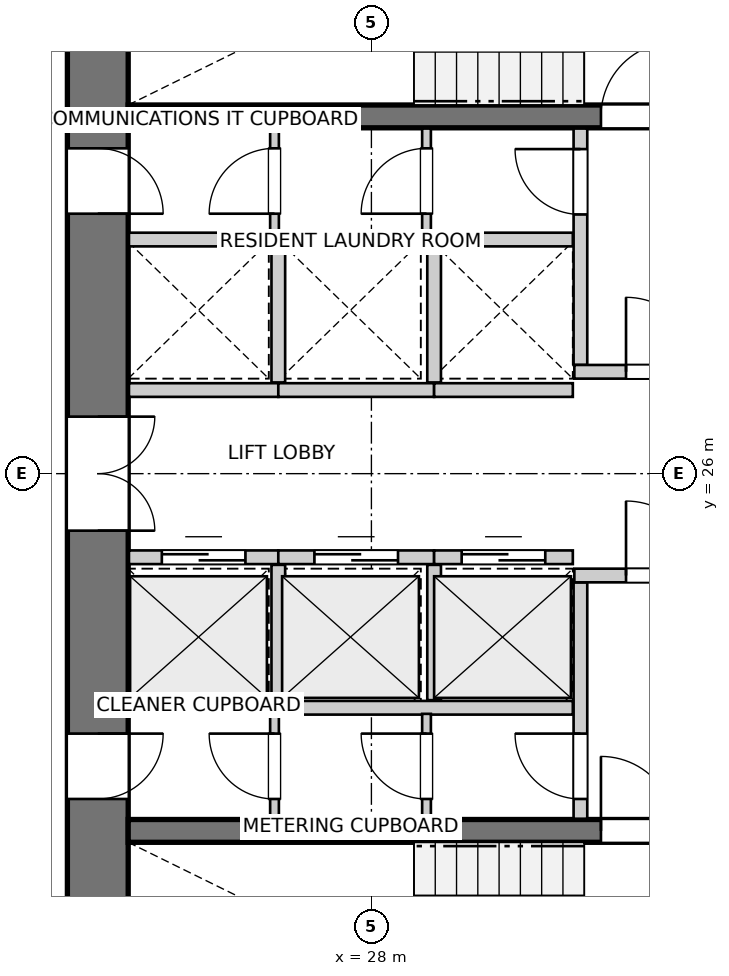
"""IFC4 building model, lengths in metres.
Left out: names, types, materials, properties, quantities, classifications, styles, units other than length and angle.
Written with IfcOpenShell. Run it as: python <this file> out.ifc"""

import sys

from ifc_helpers import new_model, si_unit, direction, frame, frame_2d, origin, place, context, subcontext, project, spatial, rectangle, extrude, source, transform, mapped, element, fill, save


model = new_model("IFC4")
c1 = context("Model", 3, precision=1e-05, world=origin(), true_north=direction((0.0, 1.0)))
c2 = subcontext(c1, "Body", "Model", "MODEL_VIEW")
j1 = project(units=[si_unit("LENGTHUNIT", "METRE"), si_unit("PLANEANGLEUNIT", "RADIAN")], contexts=[c1])
p1 = place(None, origin())
s1 = spatial("IfcSite", under=j1, at=p1, CompositionType="ELEMENT")
p2 = place(p1, origin())
s2 = spatial("IfcBuilding", under=s1, at=p2, CompositionType="ELEMENT")
p3 = place(p2, frame((0.0, 0.0, 27.0)))
s3 = spatial("IfcBuildingStorey", under=s2, at=p3, CompositionType="ELEMENT", Elevation=27.0)
p4 = place(p3, frame((24.4, 33.8, 0.0), z_axis=(0.0, 0.0, 1.0), x_axis=(0.0, -1.0, 0.0)))
e1 = element("IfcWall", 1, at=p4, inside=s3, PredefinedType="SHEAR", context=c2, shape_type="SweptSolid", body=[
    extrude(rectangle(XDim=15.6, YDim=0.8, at=frame_2d((7.8, 0.0))), origin(), (0.0, 0.0, 1.0), 2.935),
])
p5 = place(p4, frame((7.05, 0.0, 0.0)))
e2 = element("IfcOpeningElement", 2, at=p5, cuts=e1, PredefinedType="OPENING", context=c2, shape_type="SweptSolid", body=[
    extrude(rectangle(XDim=1.5, YDim=2.15, at=frame_2d((0.75, 1.075))), frame((0.0, 0.41, 0.0), z_axis=(0.0, -1.0, 0.0), x_axis=(1.0, 0.0, 0.0)), (0.0, 0.0, 1.0), 0.82),
])
p6 = place(p4, frame((3.52, 0.0, 0.0)))
e3 = element("IfcOpeningElement", 3, at=p6, cuts=e1, PredefinedType="OPENING", context=c2, shape_type="SweptSolid", body=[
    extrude(rectangle(XDim=0.86, YDim=2.05, at=frame_2d((0.43, 1.025))), frame((0.0, 0.41, 0.0), z_axis=(0.0, -1.0, 0.0), x_axis=(1.0, 0.0, 0.0)), (0.0, 0.0, 1.0), 0.82),
])
p7 = place(p4, frame((11.22, 0.0, 0.0)))
e4 = element("IfcOpeningElement", 4, at=p7, cuts=e1, PredefinedType="OPENING", context=c2, shape_type="SweptSolid", body=[
    extrude(rectangle(XDim=0.86, YDim=2.05, at=frame_2d((0.43, 1.025))), frame((0.0, 0.41, 0.0), z_axis=(0.0, -1.0, 0.0), x_axis=(1.0, 0.0, 0.0)), (0.0, 0.0, 1.0), 0.82),
])
p8 = place(p3, frame((24.8, 21.3, 0.0), z_axis=(0.0, 0.0, 1.0), x_axis=(1.0, 0.0, 0.0)))
e5 = element("IfcWall", 5, at=p8, inside=s3, PredefinedType="SHEAR", context=c2, shape_type="SweptSolid", body=[
    extrude(rectangle(XDim=11.1, YDim=0.3, at=frame_2d((5.55, 0.0))), origin(), (0.0, 0.0, 1.0), 2.935),
])
p9 = place(p8, frame((6.22, 0.0, 0.0)))
e6 = element("IfcOpeningElement", 6, at=p9, cuts=e5, PredefinedType="OPENING", context=c2, shape_type="SweptSolid", body=[
    extrude(rectangle(XDim=0.98, YDim=2.15, at=frame_2d((0.49, 1.075))), frame((0.0, 0.16, 0.0), z_axis=(0.0, -1.0, 0.0), x_axis=(1.0, 0.0, 0.0)), (0.0, 0.0, 1.0), 0.32),
])
p10 = place(p8, frame((9.15, 0.0, 0.0)))
e7 = element("IfcOpeningElement", 7, at=p10, cuts=e5, PredefinedType="OPENING", context=c2, shape_type="SweptSolid", body=[
    extrude(rectangle(XDim=1.15, YDim=2.15, at=frame_2d((0.575, 1.075))), frame((0.0, 0.16, 0.0), z_axis=(0.0, -1.0, 0.0), x_axis=(1.0, 0.0, 0.0)), (0.0, 0.0, 1.0), 0.32),
])
p11 = place(p3, frame((24.8, 30.7, 0.0), z_axis=(0.0, 0.0, 1.0), x_axis=(1.0, 0.0, 0.0)))
e8 = element("IfcWall", 8, at=p11, inside=s3, PredefinedType="SHEAR", context=c2, shape_type="SweptSolid", body=[
    extrude(rectangle(XDim=11.1, YDim=0.3, at=frame_2d((5.55, 0.0))), origin(), (0.0, 0.0, 1.0), 2.935),
])
p12 = place(p11, frame((6.22, 0.0, 0.0)))
e9 = element("IfcOpeningElement", 9, at=p12, cuts=e8, PredefinedType="OPENING", context=c2, shape_type="SweptSolid", body=[
    extrude(rectangle(XDim=0.98, YDim=2.15, at=frame_2d((0.49, 1.075))), frame((0.0, 0.16, 0.0), z_axis=(0.0, -1.0, 0.0), x_axis=(1.0, 0.0, 0.0)), (0.0, 0.0, 1.0), 0.32),
])
p13 = place(p11, frame((9.15, 0.0, 0.0)))
e10 = element("IfcOpeningElement", 10, at=p13, cuts=e8, PredefinedType="OPENING", context=c2, shape_type="SweptSolid", body=[
    extrude(rectangle(XDim=1.15, YDim=2.15, at=frame_2d((0.575, 1.075))), frame((0.0, 0.16, 0.0), z_axis=(0.0, -1.0, 0.0), x_axis=(1.0, 0.0, 0.0)), (0.0, 0.0, 1.0), 0.32),
])
p14 = place(p3, frame((30.75, 21.46, 0.0), z_axis=(0.0, 0.0, 1.0), x_axis=(0.0, 1.0, 0.0)))
e11 = element("IfcWall", 11, at=p14, inside=s3, PredefinedType="PARTITIONING", context=c2, shape_type="SweptSolid", body=[
    extrude(rectangle(XDim=3.11, YDim=0.18, at=frame_2d((1.555, 0.0))), origin(), (0.0, 0.0, 1.0), 2.935),
])
p15 = place(p14, frame((0.26, 0.0, 0.0)))
e12 = element("IfcOpeningElement", 12, at=p15, cuts=e11, PredefinedType="OPENING", context=c2, shape_type="SweptSolid", body=[
    extrude(rectangle(XDim=0.86, YDim=2.05, at=frame_2d((0.43, 1.025))), frame((0.0, 0.1, 0.0), z_axis=(0.0, -1.0, 0.0), x_axis=(1.0, 0.0, 0.0)), (0.0, 0.0, 1.0), 0.2),
])
p16 = place(p3, frame((30.67, 24.66, 0.0), z_axis=(0.0, 0.0, 1.0), x_axis=(1.0, 0.0, 0.0)))
e13 = element("IfcWall", 13, at=p16, inside=s3, PredefinedType="PARTITIONING", context=c2, shape_type="SweptSolid", body=[
    extrude(rectangle(XDim=5.22, YDim=0.18, at=frame_2d((2.61, 0.0))), origin(), (0.0, 0.0, 1.0), 2.935),
])
p17 = place(p16, frame((0.68, 0.0, 0.0)))
e14 = element("IfcOpeningElement", 14, at=p17, cuts=e13, PredefinedType="OPENING", context=c2, shape_type="SweptSolid", body=[
    extrude(rectangle(XDim=0.98, YDim=2.15, at=frame_2d((0.49, 1.075))), frame((0.0, 0.1, 0.0), z_axis=(0.0, -1.0, 0.0), x_axis=(1.0, 0.0, 0.0)), (0.0, 0.0, 1.0), 0.2),
])
p18 = place(p3, frame((30.75, 27.43, 0.0), z_axis=(0.0, 0.0, 1.0), x_axis=(0.0, 1.0, 0.0)))
e15 = element("IfcWall", 15, at=p18, inside=s3, PredefinedType="PARTITIONING", context=c2, shape_type="SweptSolid", body=[
    extrude(rectangle(XDim=3.11, YDim=0.18, at=frame_2d((1.555, 0.0))), origin(), (0.0, 0.0, 1.0), 2.935),
])
p19 = place(p18, frame((1.98, 0.0, 0.0)))
e16 = element("IfcOpeningElement", 16, at=p19, cuts=e15, PredefinedType="OPENING", context=c2, shape_type="SweptSolid", body=[
    extrude(rectangle(XDim=0.86, YDim=2.05, at=frame_2d((0.43, 1.025))), frame((0.0, 0.1, 0.0), z_axis=(0.0, -1.0, 0.0), x_axis=(1.0, 0.0, 0.0)), (0.0, 0.0, 1.0), 0.2),
])
p20 = place(p3, frame((30.67, 27.34, 0.0), z_axis=(0.0, 0.0, 1.0), x_axis=(1.0, 0.0, 0.0)))
e17 = element("IfcWall", 17, at=p20, inside=s3, PredefinedType="PARTITIONING", context=c2, shape_type="SweptSolid", body=[
    extrude(rectangle(XDim=5.22, YDim=0.18, at=frame_2d((2.61, 0.0))), origin(), (0.0, 0.0, 1.0), 2.935),
])
p21 = place(p20, frame((0.68, 0.0, 0.0)))
e18 = element("IfcOpeningElement", 18, at=p21, cuts=e17, PredefinedType="OPENING", context=c2, shape_type="SweptSolid", body=[
    extrude(rectangle(XDim=0.98, YDim=2.15, at=frame_2d((0.49, 1.075))), frame((0.0, 0.1, 0.0), z_axis=(0.0, -1.0, 0.0), x_axis=(1.0, 0.0, 0.0)), (0.0, 0.0, 1.0), 0.2),
])
p22 = place(p3, frame((24.81, 22.92, 0.0), z_axis=(0.0, 0.0, 1.0), x_axis=(1.0, 0.0, 0.0)))
e19 = element("IfcWall", 19, at=p22, inside=s3, PredefinedType="PARTITIONING", context=c2, shape_type="SweptSolid", body=[
    extrude(rectangle(XDim=5.84, YDim=0.18, at=frame_2d((2.92, 0.0))), origin(), (0.0, 0.0, 1.0), 2.935),
])
p23 = place(p3, frame((24.81, 24.9, 0.0), z_axis=(0.0, 0.0, 1.0), x_axis=(1.0, 0.0, 0.0)))
e20 = element("IfcWall", 20, at=p23, inside=s3, PredefinedType="PARTITIONING", context=c2, shape_type="SweptSolid", body=[
    extrude(rectangle(XDim=1.965, YDim=0.18, at=frame_2d((0.982, 0.0))), origin(), (0.0, 0.0, 1.0), 2.935),
])
p24 = place(p23, frame((0.433, 0.0, 0.0)))
e21 = element("IfcOpeningElement", 21, at=p24, cuts=e20, PredefinedType="OPENING", context=c2, shape_type="SweptSolid", body=[
    extrude(rectangle(XDim=1.1, YDim=2.15, at=frame_2d((0.55, 1.075))), frame((0.0, 0.1, 0.0), z_axis=(0.0, -1.0, 0.0), x_axis=(1.0, 0.0, 0.0)), (0.0, 0.0, 1.0), 0.2),
])
p25 = place(p3, frame((26.775, 24.9, 0.0), z_axis=(0.0, 0.0, 1.0), x_axis=(1.0, 0.0, 0.0)))
e22 = element("IfcWall", 22, at=p25, inside=s3, PredefinedType="PARTITIONING", context=c2, shape_type="SweptSolid", body=[
    extrude(rectangle(XDim=2.05, YDim=0.18, at=frame_2d((1.025, 0.0))), origin(), (0.0, 0.0, 1.0), 2.935),
])
p26 = place(p25, frame((0.475, 0.0, 0.0)))
e23 = element("IfcOpeningElement", 23, at=p26, cuts=e22, PredefinedType="OPENING", context=c2, shape_type="SweptSolid", body=[
    extrude(rectangle(XDim=1.1, YDim=2.15, at=frame_2d((0.55, 1.075))), frame((0.0, 0.1, 0.0), z_axis=(0.0, -1.0, 0.0), x_axis=(1.0, 0.0, 0.0)), (0.0, 0.0, 1.0), 0.2),
])
p27 = place(p3, frame((26.775, 23.02, 0.0), z_axis=(0.0, 0.0, 1.0), x_axis=(0.0, 1.0, 0.0)))
e24 = element("IfcWall", 24, at=p27, inside=s3, PredefinedType="PARTITIONING", context=c2, shape_type="SweptSolid", body=[
    extrude(rectangle(XDim=1.78, YDim=0.18, at=frame_2d((0.89, 0.0))), origin(), (0.0, 0.0, 1.0), 2.935),
])
p28 = place(p3, frame((28.825, 24.9, 0.0), z_axis=(0.0, 0.0, 1.0), x_axis=(1.0, 0.0, 0.0)))
e25 = element("IfcWall", 25, at=p28, inside=s3, PredefinedType="PARTITIONING", context=c2, shape_type="SweptSolid", body=[
    extrude(rectangle(XDim=1.825, YDim=0.18, at=frame_2d((0.913, 0.0))), origin(), (0.0, 0.0, 1.0), 2.935),
])
p29 = place(p28, frame((0.363, 0.0, 0.0)))
e26 = element("IfcOpeningElement", 26, at=p29, cuts=e25, PredefinedType="OPENING", context=c2, shape_type="SweptSolid", body=[
    extrude(rectangle(XDim=1.1, YDim=2.15, at=frame_2d((0.55, 1.075))), frame((0.0, 0.1, 0.0), z_axis=(0.0, -1.0, 0.0), x_axis=(1.0, 0.0, 0.0)), (0.0, 0.0, 1.0), 0.2),
])
p30 = place(p3, frame((28.825, 23.02, 0.0), z_axis=(0.0, 0.0, 1.0), x_axis=(0.0, 1.0, 0.0)))
e27 = element("IfcWall", 27, at=p30, inside=s3, PredefinedType="PARTITIONING", context=c2, shape_type="SweptSolid", body=[
    extrude(rectangle(XDim=1.78, YDim=0.18, at=frame_2d((0.89, 0.0))), origin(), (0.0, 0.0, 1.0), 2.935),
])
p31 = place(p3, frame((24.81, 29.08, 0.0), z_axis=(0.0, 0.0, 1.0), x_axis=(1.0, 0.0, 0.0)))
e28 = element("IfcWall", 28, at=p31, inside=s3, PredefinedType="PARTITIONING", context=c2, shape_type="SweptSolid", body=[
    extrude(rectangle(XDim=5.84, YDim=0.18, at=frame_2d((2.92, 0.0))), origin(), (0.0, 0.0, 1.0), 2.935),
])
p32 = place(p3, frame((24.81, 27.1, 0.0), z_axis=(0.0, 0.0, 1.0), x_axis=(1.0, 0.0, 0.0)))
e29 = element("IfcWall", 29, at=p32, inside=s3, PredefinedType="PARTITIONING", context=c2, shape_type="SweptSolid", body=[
    extrude(rectangle(XDim=1.965, YDim=0.18, at=frame_2d((0.982, 0.0))), origin(), (0.0, 0.0, 1.0), 2.935),
])
p33 = place(p3, frame((26.775, 27.1, 0.0), z_axis=(0.0, 0.0, 1.0), x_axis=(1.0, 0.0, 0.0)))
e30 = element("IfcWall", 30, at=p33, inside=s3, PredefinedType="PARTITIONING", context=c2, shape_type="SweptSolid", body=[
    extrude(rectangle(XDim=2.05, YDim=0.18, at=frame_2d((1.025, 0.0))), origin(), (0.0, 0.0, 1.0), 2.935),
])
p34 = place(p3, frame((26.775, 27.2, 0.0), z_axis=(0.0, 0.0, 1.0), x_axis=(0.0, 1.0, 0.0)))
e31 = element("IfcWall", 31, at=p34, inside=s3, PredefinedType="PARTITIONING", context=c2, shape_type="SweptSolid", body=[
    extrude(rectangle(XDim=1.78, YDim=0.18, at=frame_2d((0.89, 0.0))), origin(), (0.0, 0.0, 1.0), 2.935),
])
p35 = place(p3, frame((28.825, 27.1, 0.0), z_axis=(0.0, 0.0, 1.0), x_axis=(1.0, 0.0, 0.0)))
e32 = element("IfcWall", 32, at=p35, inside=s3, PredefinedType="PARTITIONING", context=c2, shape_type="SweptSolid", body=[
    extrude(rectangle(XDim=1.825, YDim=0.18, at=frame_2d((0.913, 0.0))), origin(), (0.0, 0.0, 1.0), 2.935),
])
p36 = place(p3, frame((28.825, 27.2, 0.0), z_axis=(0.0, 0.0, 1.0), x_axis=(0.0, 1.0, 0.0)))
e33 = element("IfcWall", 33, at=p36, inside=s3, PredefinedType="PARTITIONING", context=c2, shape_type="SweptSolid", body=[
    extrude(rectangle(XDim=1.78, YDim=0.18, at=frame_2d((0.89, 0.0))), origin(), (0.0, 0.0, 1.0), 2.935),
])
p37 = place(p3, frame((26.725, 21.46, 0.0), z_axis=(0.0, 0.0, 1.0), x_axis=(0.0, 1.0, 0.0)))
e34 = element("IfcWall", 34, at=p37, inside=s3, PredefinedType="PARTITIONING", context=c2, shape_type="SweptSolid", body=[
    extrude(rectangle(XDim=1.38, YDim=0.115, at=frame_2d((0.69, 0.0))), origin(), (0.0, 0.0, 1.0), 2.935),
])
p38 = place(p37, frame((0.26, 0.0, 0.0)))
e35 = element("IfcOpeningElement", 35, at=p38, cuts=e34, PredefinedType="OPENING", context=c2, shape_type="SweptSolid", body=[
    extrude(rectangle(XDim=0.86, YDim=2.05, at=frame_2d((0.43, 1.025))), frame((0.0, 0.067, 0.0), z_axis=(0.0, -1.0, 0.0), x_axis=(1.0, 0.0, 0.0)), (0.0, 0.0, 1.0), 0.135),
])
p39 = place(p3, frame((26.725, 29.16, 0.0), z_axis=(0.0, 0.0, 1.0), x_axis=(0.0, 1.0, 0.0)))
e36 = element("IfcWall", 36, at=p39, inside=s3, PredefinedType="PARTITIONING", context=c2, shape_type="SweptSolid", body=[
    extrude(rectangle(XDim=1.38, YDim=0.115, at=frame_2d((0.69, 0.0))), origin(), (0.0, 0.0, 1.0), 2.935),
])
p40 = place(p39, frame((0.26, 0.0, 0.0)))
e37 = element("IfcOpeningElement", 37, at=p40, cuts=e36, PredefinedType="OPENING", context=c2, shape_type="SweptSolid", body=[
    extrude(rectangle(XDim=0.86, YDim=2.05, at=frame_2d((0.43, 1.025))), frame((0.0, 0.067, 0.0), z_axis=(0.0, -1.0, 0.0), x_axis=(1.0, 0.0, 0.0)), (0.0, 0.0, 1.0), 0.135),
])
p41 = place(p3, frame((28.725, 21.46, 0.0), z_axis=(0.0, 0.0, 1.0), x_axis=(0.0, 1.0, 0.0)))
e38 = element("IfcWall", 38, at=p41, inside=s3, PredefinedType="PARTITIONING", context=c2, shape_type="SweptSolid", body=[
    extrude(rectangle(XDim=1.38, YDim=0.115, at=frame_2d((0.69, 0.0))), origin(), (0.0, 0.0, 1.0), 2.935),
])
p42 = place(p41, frame((0.26, 0.0, 0.0)))
e39 = element("IfcOpeningElement", 39, at=p42, cuts=e38, PredefinedType="OPENING", context=c2, shape_type="SweptSolid", body=[
    extrude(rectangle(XDim=0.86, YDim=2.05, at=frame_2d((0.43, 1.025))), frame((0.0, 0.067, 0.0), z_axis=(0.0, -1.0, 0.0), x_axis=(1.0, 0.0, 0.0)), (0.0, 0.0, 1.0), 0.135),
])
p43 = place(p3, frame((28.725, 29.16, 0.0), z_axis=(0.0, 0.0, 1.0), x_axis=(0.0, 1.0, 0.0)))
e40 = element("IfcWall", 40, at=p43, inside=s3, PredefinedType="PARTITIONING", context=c2, shape_type="SweptSolid", body=[
    extrude(rectangle(XDim=1.38, YDim=0.115, at=frame_2d((0.69, 0.0))), origin(), (0.0, 0.0, 1.0), 2.935),
])
p44 = place(p43, frame((0.26, 0.0, 0.0)))
e41 = element("IfcOpeningElement", 41, at=p44, cuts=e40, PredefinedType="OPENING", context=c2, shape_type="SweptSolid", body=[
    extrude(rectangle(XDim=0.86, YDim=2.05, at=frame_2d((0.43, 1.025))), frame((0.0, 0.067, 0.0), z_axis=(0.0, -1.0, 0.0), x_axis=(1.0, 0.0, 0.0)), (0.0, 0.0, 1.0), 0.135),
])
m1 = source(origin(), c2, "Body", "SweptSolid", [
    extrude(rectangle(XDim=0.98, YDim=2.15, at=frame_2d((0.49, 1.075))), frame((0.0, 0.025, 0.0), z_axis=(0.0, -1.0, 0.0), x_axis=(1.0, 0.0, 0.0)), (0.0, 0.0, 1.0), 0.05),
])
p45 = place(p9, origin())
e42 = element("IfcDoor", 42, at=p45, inside=s3, OperationType="SINGLE_SWING_LEFT", PredefinedType="DOOR", context=c2, shape_type="MappedRepresentation", body=[
    mapped(m1, transform((0.0, 0.0, 0.0), x_axis=(1.0, 0.0, 0.0), y_axis=(0.0, 1.0, 0.0), z_axis=(0.0, 0.0, 1.0), scale=1.0)),
])
fill(e6, e42)
p46 = place(p12, origin())
e43 = element("IfcDoor", 43, at=p46, inside=s3, OperationType="SINGLE_SWING_RIGHT", PredefinedType="DOOR", context=c2, shape_type="MappedRepresentation", body=[
    mapped(m1, transform((0.0, 0.0, 0.0), x_axis=(1.0, 0.0, 0.0), y_axis=(0.0, 1.0, 0.0), z_axis=(0.0, 0.0, 1.0), scale=1.0)),
])
fill(e9, e43)
m2 = source(origin(), c2, "Body", "SweptSolid", [
    extrude(rectangle(XDim=1.5, YDim=2.15, at=frame_2d((0.75, 1.075))), frame((0.0, 0.025, 0.0), z_axis=(0.0, -1.0, 0.0), x_axis=(1.0, 0.0, 0.0)), (0.0, 0.0, 1.0), 0.05),
])
p47 = place(p5, origin())
e44 = element("IfcDoor", 44, at=p47, inside=s3, OperationType="DOUBLE_DOOR_SINGLE_SWING", PredefinedType="DOOR", context=c2, shape_type="MappedRepresentation", body=[
    mapped(m2, transform((0.0, 0.0, 0.0), x_axis=(1.0, 0.0, 0.0), y_axis=(0.0, 1.0, 0.0), z_axis=(0.0, 0.0, 1.0), scale=1.0)),
])
fill(e2, e44)
m3 = source(origin(), c2, "Body", "SweptSolid", [
    extrude(rectangle(XDim=0.86, YDim=2.05, at=frame_2d((0.43, 1.025))), frame((0.0, 0.025, 0.0), z_axis=(0.0, -1.0, 0.0), x_axis=(1.0, 0.0, 0.0)), (0.0, 0.0, 1.0), 0.05),
])
p48 = place(p6, origin())
e45 = element("IfcDoor", 45, at=p48, inside=s3, OperationType="SINGLE_SWING_RIGHT", PredefinedType="DOOR", context=c2, shape_type="MappedRepresentation", body=[
    mapped(m3, transform((0.0, 0.0, 0.0), x_axis=(1.0, 0.0, 0.0), y_axis=(0.0, 1.0, 0.0), z_axis=(0.0, 0.0, 1.0), scale=1.0)),
])
fill(e3, e45)
p49 = place(p7, origin())
e46 = element("IfcDoor", 46, at=p49, inside=s3, OperationType="SINGLE_SWING_LEFT", PredefinedType="DOOR", context=c2, shape_type="MappedRepresentation", body=[
    mapped(m3, transform((0.0, 0.0, 0.0), x_axis=(1.0, 0.0, 0.0), y_axis=(0.0, 1.0, 0.0), z_axis=(0.0, 0.0, 1.0), scale=1.0)),
])
fill(e4, e46)
p50 = place(p15, origin())
e47 = element("IfcDoor", 47, at=p50, inside=s3, OperationType="SINGLE_SWING_RIGHT", PredefinedType="DOOR", context=c2, shape_type="MappedRepresentation", body=[
    mapped(m3, transform((0.0, 0.0, 0.0), x_axis=(1.0, 0.0, 0.0), y_axis=(0.0, 1.0, 0.0), z_axis=(0.0, 0.0, 1.0), scale=1.0)),
])
fill(e12, e47)
p51 = place(p17, origin())
e48 = element("IfcDoor", 48, at=p51, inside=s3, OperationType="SINGLE_SWING_LEFT", PredefinedType="DOOR", context=c2, shape_type="MappedRepresentation", body=[
    mapped(m1, transform((0.0, 0.0, 0.0), x_axis=(1.0, 0.0, 0.0), y_axis=(0.0, 1.0, 0.0), z_axis=(0.0, 0.0, 1.0), scale=1.0)),
])
fill(e14, e48)
p52 = place(p19, origin())
e49 = element("IfcDoor", 49, at=p52, inside=s3, OperationType="SINGLE_SWING_RIGHT", PredefinedType="DOOR", context=c2, shape_type="MappedRepresentation", body=[
    mapped(m3, transform((0.0, 0.0, 0.0), x_axis=(1.0, 0.0, 0.0), y_axis=(0.0, 1.0, 0.0), z_axis=(0.0, 0.0, 1.0), scale=1.0)),
])
fill(e16, e49)
p53 = place(p21, origin())
e50 = element("IfcDoor", 50, at=p53, inside=s3, OperationType="SINGLE_SWING_LEFT", PredefinedType="DOOR", context=c2, shape_type="MappedRepresentation", body=[
    mapped(m1, transform((0.0, 0.0, 0.0), x_axis=(1.0, 0.0, 0.0), y_axis=(0.0, 1.0, 0.0), z_axis=(0.0, 0.0, 1.0), scale=1.0)),
])
fill(e18, e50)
m4 = source(origin(), c2, "Body", "SweptSolid", [
    extrude(rectangle(XDim=1.1, YDim=2.15, at=frame_2d((0.55, 1.075))), frame((0.0, 0.025, 0.0), z_axis=(0.0, -1.0, 0.0), x_axis=(1.0, 0.0, 0.0)), (0.0, 0.0, 1.0), 0.05),
])
p54 = place(p24, origin())
e51 = element("IfcDoor", 51, at=p54, inside=s3, OperationType="DOUBLE_DOOR_SLIDING", PredefinedType="DOOR", context=c2, shape_type="MappedRepresentation", body=[
    mapped(m4, transform((0.0, 0.0, 0.0), x_axis=(1.0, 0.0, 0.0), y_axis=(0.0, 1.0, 0.0), z_axis=(0.0, 0.0, 1.0), scale=1.0)),
])
fill(e21, e51)
p55 = place(p26, origin())
e52 = element("IfcDoor", 52, at=p55, inside=s3, OperationType="DOUBLE_DOOR_SLIDING", PredefinedType="DOOR", context=c2, shape_type="MappedRepresentation", body=[
    mapped(m4, transform((0.0, 0.0, 0.0), x_axis=(1.0, 0.0, 0.0), y_axis=(0.0, 1.0, 0.0), z_axis=(0.0, 0.0, 1.0), scale=1.0)),
])
fill(e23, e52)
p56 = place(p29, origin())
e53 = element("IfcDoor", 53, at=p56, inside=s3, OperationType="DOUBLE_DOOR_SLIDING", PredefinedType="DOOR", context=c2, shape_type="MappedRepresentation", body=[
    mapped(m4, transform((0.0, 0.0, 0.0), x_axis=(1.0, 0.0, 0.0), y_axis=(0.0, 1.0, 0.0), z_axis=(0.0, 0.0, 1.0), scale=1.0)),
])
fill(e26, e53)
p57 = place(p38, origin())
e54 = element("IfcDoor", 54, at=p57, inside=s3, OperationType="SINGLE_SWING_RIGHT", PredefinedType="DOOR", context=c2, shape_type="MappedRepresentation", body=[
    mapped(m3, transform((0.0, 0.0, 0.0), x_axis=(1.0, 0.0, 0.0), y_axis=(0.0, 1.0, 0.0), z_axis=(0.0, 0.0, 1.0), scale=1.0)),
])
fill(e35, e54)
p58 = place(p40, origin())
e55 = element("IfcDoor", 55, at=p58, inside=s3, OperationType="SINGLE_SWING_LEFT", PredefinedType="DOOR", context=c2, shape_type="MappedRepresentation", body=[
    mapped(m3, transform((0.0, 0.0, 0.0), x_axis=(1.0, 0.0, 0.0), y_axis=(0.0, 1.0, 0.0), z_axis=(0.0, 0.0, 1.0), scale=1.0)),
])
fill(e37, e55)
p59 = place(p42, origin())
e56 = element("IfcDoor", 56, at=p59, inside=s3, OperationType="SINGLE_SWING_RIGHT", PredefinedType="DOOR", context=c2, shape_type="MappedRepresentation", body=[
    mapped(m3, transform((0.0, 0.0, 0.0), x_axis=(1.0, 0.0, 0.0), y_axis=(0.0, 1.0, 0.0), z_axis=(0.0, 0.0, 1.0), scale=1.0)),
])
fill(e39, e56)
p60 = place(p44, origin())
e57 = element("IfcDoor", 57, at=p60, inside=s3, OperationType="SINGLE_SWING_LEFT", PredefinedType="DOOR", context=c2, shape_type="MappedRepresentation", body=[
    mapped(m3, transform((0.0, 0.0, 0.0), x_axis=(1.0, 0.0, 0.0), y_axis=(0.0, 1.0, 0.0), z_axis=(0.0, 0.0, 1.0), scale=1.0)),
])
fill(e41, e57)
save(model, sys.argv[1])
